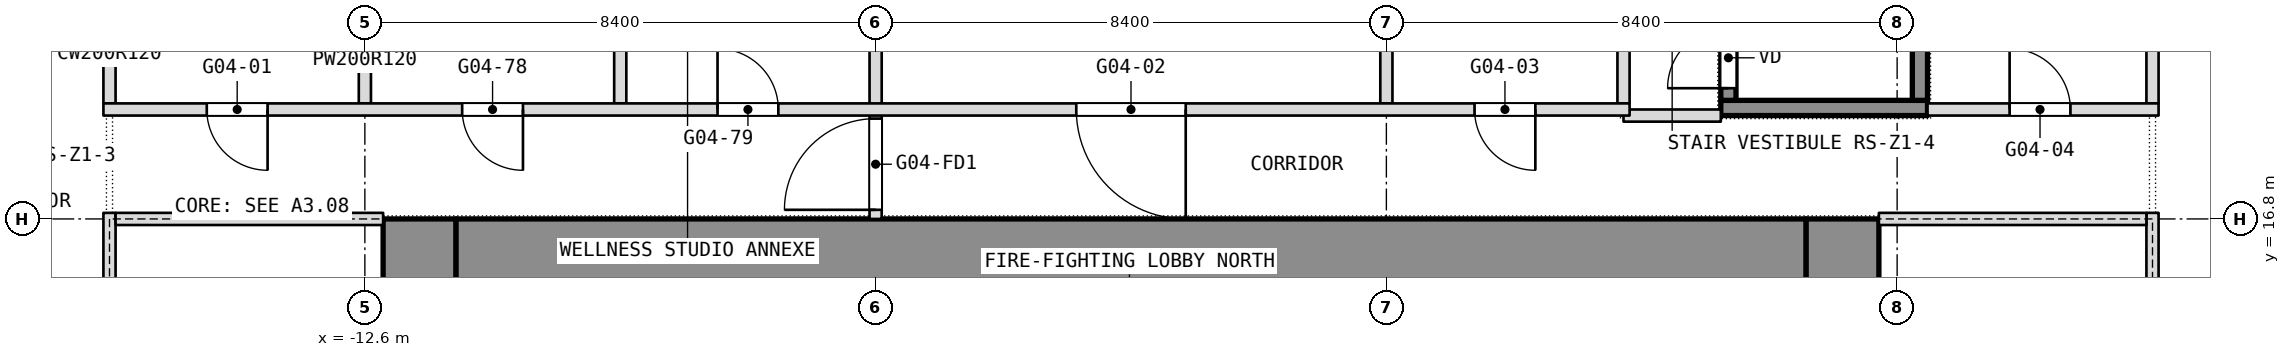
"""IFC4 building model, lengths in metres.
Left out: names, types, materials, properties, quantities, classifications, styles, units other than length and angle.
Written with IfcOpenShell. Run it as: python <this file> out.ifc"""

import sys

from ifc_helpers import new_model, si_unit, direction, frame, frame_2d, origin, place, context, subcontext, project, spatial, rectangle, extrude, element, fill, save


model = new_model("IFC4")
c1 = context("Model", 3, precision=1e-05, world=origin(), true_north=direction((0.0, 1.0)))
c2 = subcontext(c1, "Body", "Model", "MODEL_VIEW")
j1 = project(units=[si_unit("LENGTHUNIT", "METRE"), si_unit("PLANEANGLEUNIT", "RADIAN")], contexts=[c1])
p1 = place(None, origin())
s1 = spatial("IfcSite", under=j1, at=p1, CompositionType="ELEMENT")
p2 = place(p1, origin())
s2 = spatial("IfcBuilding", under=s1, at=p2, CompositionType="ELEMENT")
p3 = place(p2, frame((0.0, 0.0, 61.7)))
s3 = spatial("IfcBuildingStorey", under=s2, at=p3, CompositionType="ELEMENT", Elevation=61.7)
p4 = place(p3, frame((11.7, 0.0, 0.0), z_axis=(0.0, 0.0, 1.0), x_axis=(0.0, 1.0, 0.0)))
e1 = element("IfcWall", 1, at=p4, inside=s3, PredefinedType="SHEAR", context=c2, shape_type="SweptSolid", body=[
    extrude(rectangle(XDim=16.8, YDim=1.2, at=frame_2d((8.4, 0.0))), origin(), (0.0, 0.0, 1.0), 3.6),
])
p5 = place(p4, frame((1.762, 0.0, 0.0)))
e2 = element("IfcOpeningElement", 2, at=p5, cuts=e1, PredefinedType="OPENING", context=c2, shape_type="SweptSolid", body=[
    extrude(rectangle(XDim=0.9, YDim=2.1, at=frame_2d((0.45, 1.05))), frame((0.0, 0.6, 0.0), z_axis=(0.0, -1.0, 0.0), x_axis=(1.0, 0.0, 0.0)), (0.0, 0.0, 1.0), 1.2),
])
p6 = place(p4, frame((4.387, 0.0, 0.0)))
e3 = element("IfcOpeningElement", 3, at=p6, cuts=e1, PredefinedType="OPENING", context=c2, shape_type="SweptSolid", body=[
    extrude(rectangle(XDim=0.9, YDim=2.1, at=frame_2d((0.45, 1.05))), frame((0.0, 0.6, 0.0), z_axis=(0.0, -1.0, 0.0), x_axis=(1.0, 0.0, 0.0)), (0.0, 0.0, 1.0), 1.2),
])
p7 = place(p4, frame((6.825, 0.0, 0.0)))
e4 = element("IfcOpeningElement", 4, at=p7, cuts=e1, PredefinedType="OPENING", context=c2, shape_type="SweptSolid", body=[
    extrude(rectangle(XDim=1.2, YDim=2.1, at=frame_2d((0.6, 1.05))), frame((0.0, 0.6, 0.0), z_axis=(0.0, -1.0, 0.0), x_axis=(1.0, 0.0, 0.0)), (0.0, 0.0, 1.0), 1.2),
])
p8 = place(p4, frame((14.137, 0.0, 0.0)))
e5 = element("IfcOpeningElement", 5, at=p8, cuts=e1, PredefinedType="OPENING", context=c2, shape_type="SweptSolid", body=[
    extrude(rectangle(XDim=0.9, YDim=2.1, at=frame_2d((0.45, 1.05))), frame((0.0, 0.6, 0.0), z_axis=(0.0, -1.0, 0.0), x_axis=(1.0, 0.0, 0.0)), (0.0, 0.0, 1.0), 1.2),
])
p9 = place(p4, frame((11.512, 0.0, 0.0)))
e6 = element("IfcOpeningElement", 6, at=p9, cuts=e1, PredefinedType="OPENING", context=c2, shape_type="SweptSolid", body=[
    extrude(rectangle(XDim=0.9, YDim=2.1, at=frame_2d((0.45, 1.05))), frame((0.0, 0.6, 0.0), z_axis=(0.0, -1.0, 0.0), x_axis=(1.0, 0.0, 0.0)), (0.0, 0.0, 1.0), 1.2),
])
p10 = place(p4, frame((8.775, 0.0, 0.0)))
e7 = element("IfcOpeningElement", 7, at=p10, cuts=e1, PredefinedType="OPENING", context=c2, shape_type="SweptSolid", body=[
    extrude(rectangle(XDim=1.2, YDim=2.1, at=frame_2d((0.6, 1.05))), frame((0.0, 0.6, 0.0), z_axis=(0.0, -1.0, 0.0), x_axis=(1.0, 0.0, 0.0)), (0.0, 0.0, 1.0), 1.2),
])
p11 = place(p3, frame((-11.7, 0.0, 0.0), z_axis=(0.0, 0.0, 1.0), x_axis=(0.0, 1.0, 0.0)))
e8 = element("IfcWall", 8, at=p11, inside=s3, PredefinedType="SHEAR", context=c2, shape_type="SweptSolid", body=[
    extrude(rectangle(XDim=16.8, YDim=1.2, at=frame_2d((8.4, 0.0))), origin(), (0.0, 0.0, 1.0), 3.6),
])
p12 = place(p11, frame((2.3, 0.0, 0.0)))
e9 = element("IfcOpeningElement", 9, at=p12, cuts=e8, PredefinedType="OPENING", context=c2, shape_type="SweptSolid", body=[
    extrude(rectangle(XDim=1.1, YDim=2.1, at=frame_2d((0.55, 1.05))), frame((0.0, 0.6, 0.0), z_axis=(0.0, -1.0, 0.0), x_axis=(1.0, 0.0, 0.0)), (0.0, 0.0, 1.0), 1.2),
])
p13 = place(p11, frame((4.85, 0.0, 0.0)))
e10 = element("IfcOpeningElement", 10, at=p13, cuts=e8, PredefinedType="OPENING", context=c2, shape_type="SweptSolid", body=[
    extrude(rectangle(XDim=1.1, YDim=2.1, at=frame_2d((0.55, 1.05))), frame((0.0, 0.6, 0.0), z_axis=(0.0, -1.0, 0.0), x_axis=(1.0, 0.0, 0.0)), (0.0, 0.0, 1.0), 1.2),
])
p14 = place(p11, frame((6.825, 0.0, 0.0)))
e11 = element("IfcOpeningElement", 11, at=p14, cuts=e8, PredefinedType="OPENING", context=c2, shape_type="SweptSolid", body=[
    extrude(rectangle(XDim=1.2, YDim=2.1, at=frame_2d((0.6, 1.05))), frame((0.0, 0.6, 0.0), z_axis=(0.0, -1.0, 0.0), x_axis=(1.0, 0.0, 0.0)), (0.0, 0.0, 1.0), 1.2),
])
p15 = place(p11, frame((13.4, 0.0, 0.0)))
e12 = element("IfcOpeningElement", 12, at=p15, cuts=e8, PredefinedType="OPENING", context=c2, shape_type="SweptSolid", body=[
    extrude(rectangle(XDim=1.1, YDim=2.1, at=frame_2d((0.55, 1.05))), frame((0.0, 0.6, 0.0), z_axis=(0.0, -1.0, 0.0), x_axis=(1.0, 0.0, 0.0)), (0.0, 0.0, 1.0), 1.2),
])
p16 = place(p11, frame((10.85, 0.0, 0.0)))
e13 = element("IfcOpeningElement", 13, at=p16, cuts=e8, PredefinedType="OPENING", context=c2, shape_type="SweptSolid", body=[
    extrude(rectangle(XDim=1.1, YDim=2.1, at=frame_2d((0.55, 1.05))), frame((0.0, 0.6, 0.0), z_axis=(0.0, -1.0, 0.0), x_axis=(1.0, 0.0, 0.0)), (0.0, 0.0, 1.0), 1.2),
])
p17 = place(p11, frame((8.775, 0.0, 0.0)))
e14 = element("IfcOpeningElement", 14, at=p17, cuts=e8, PredefinedType="OPENING", context=c2, shape_type="SweptSolid", body=[
    extrude(rectangle(XDim=1.2, YDim=2.1, at=frame_2d((0.6, 1.05))), frame((0.0, 0.6, 0.0), z_axis=(0.0, -1.0, 0.0), x_axis=(1.0, 0.0, 0.0)), (0.0, 0.0, 1.0), 1.2),
])
p18 = place(p3, frame((-11.1, 16.2, 0.0), z_axis=(0.0, 0.0, 1.0), x_axis=(1.0, 0.0, 0.0)))
e15 = element("IfcWall", 15, at=p18, inside=s3, PredefinedType="SHEAR", context=c2, shape_type="SweptSolid", body=[
    extrude(rectangle(XDim=22.2, YDim=1.2, at=frame_2d((11.1, 0.0))), origin(), (0.0, 0.0, 1.0), 3.6),
])
p19 = place(p3, frame((16.8, 18.7, 0.0), z_axis=(0.0, 0.0, 1.0), x_axis=(0.0, 1.0, 0.0)))
e16 = element("IfcWall", 16, at=p19, inside=s3, PredefinedType="PARTITIONING", context=c2, shape_type="SweptSolid", body=[
    extrude(rectangle(XDim=3.0, YDim=0.2, at=frame_2d((1.5, 0.0))), origin(), (0.0, 0.0, 1.0), 3.34),
])
for number, where, z_axis, x_axis in (
    (17, (8.1, 18.7, 0.0), (0.0, 0.0, 1.0), (0.0, 1.0, 0.0)),
    (18, (4.2, 18.7, 0.0), (0.0, 0.0, 1.0), (0.0, 1.0, 0.0)),
):
    element("IfcWall", number, at=place(p3, frame(where, z_axis=z_axis, x_axis=x_axis)), inside=s3, PredefinedType="PARTITIONING", context=c2, shape_type="SweptSolid", body=[
        extrude(rectangle(XDim=2.8, YDim=0.2, at=frame_2d((1.4, 0.0))), origin(), (0.0, 0.0, 1.0), 3.34),
    ])
p20 = place(p3, frame((-4.2, 16.8, 0.0), z_axis=(0.0, 0.0, 1.0), x_axis=(0.0, 1.0, 0.0)))
e19 = element("IfcWall", 19, at=p20, inside=s3, PredefinedType="PARTITIONING", context=c2, shape_type="SweptSolid", body=[
    extrude(rectangle(XDim=6.7, YDim=0.2, at=frame_2d((3.35, 0.0))), origin(), (0.0, 0.0, 1.0), 3.34),
])
p21 = place(p20, frame((0.15, 0.0, 0.0)))
e20 = element("IfcOpeningElement", 20, at=p21, cuts=e19, PredefinedType="OPENING", context=c2, shape_type="SweptSolid", body=[
    extrude(rectangle(XDim=1.5, YDim=2.1, at=frame_2d((0.75, 1.05))), frame((0.0, 0.1, 0.0), z_axis=(0.0, -1.0, 0.0), x_axis=(1.0, 0.0, 0.0)), (0.0, 0.0, 1.0), 0.2),
])
p22 = place(p20, frame((4.95, 0.0, 0.0)))
e21 = element("IfcOpeningElement", 21, at=p22, cuts=e19, PredefinedType="OPENING", context=c2, shape_type="SweptSolid", body=[
    extrude(rectangle(XDim=1.5, YDim=2.1, at=frame_2d((0.75, 1.05))), frame((0.0, 0.1, 0.0), z_axis=(0.0, -1.0, 0.0), x_axis=(1.0, 0.0, 0.0)), (0.0, 0.0, 1.0), 0.2),
])
for number, where, z_axis, x_axis in (
    (22, (-8.4, 18.7, 0.0), (0.0, 0.0, 1.0), (0.0, 1.0, 0.0)),
    (23, (-12.6, 18.7, 0.0), (0.0, 0.0, 1.0), (0.0, 1.0, 0.0)),
):
    element("IfcWall", number, at=place(p3, frame(where, z_axis=z_axis, x_axis=x_axis)), inside=s3, PredefinedType="PARTITIONING", context=c2, shape_type="SweptSolid", body=[
        extrude(rectangle(XDim=2.8, YDim=0.2, at=frame_2d((1.4, 0.0))), origin(), (0.0, 0.0, 1.0), 3.34),
    ])
p23 = place(p3, frame((-16.8, 18.7, 0.0), z_axis=(0.0, 0.0, 1.0), x_axis=(0.0, 1.0, 0.0)))
e24 = element("IfcWall", 24, at=p23, inside=s3, PredefinedType="PARTITIONING", context=c2, shape_type="SweptSolid", body=[
    extrude(rectangle(XDim=3.0, YDim=0.2, at=frame_2d((1.5, 0.0))), origin(), (0.0, 0.0, 1.0), 3.34),
])
p24 = place(p3, frame((8.1, 18.5, 0.0), z_axis=(0.0, 0.0, 1.0), x_axis=(1.0, 0.0, 0.0)))
e25 = element("IfcWall", 25, at=p24, inside=s3, PredefinedType="PARTITIONING", context=c2, shape_type="SweptSolid", body=[
    extrude(rectangle(XDim=1.6, YDim=0.2, at=frame_2d((0.8, 0.0))), origin(), (0.0, 0.0, 1.0), 3.34),
])
p25 = place(p3, frame((-16.9, 18.6, 0.0), z_axis=(0.0, 0.0, 1.0), x_axis=(1.0, 0.0, 0.0)))
e26 = element("IfcWall", 26, at=p25, inside=s3, PredefinedType="PARTITIONING", context=c2, shape_type="SweptSolid", body=[
    extrude(rectangle(XDim=25.1, YDim=0.2, at=frame_2d((12.55, 0.0))), origin(), (0.0, 0.0, 1.0), 3.34),
])
p26 = place(p25, frame((1.7, 0.0, 0.0)))
e27 = element("IfcOpeningElement", 27, at=p26, cuts=e26, PredefinedType="OPENING", context=c2, shape_type="SweptSolid", body=[
    extrude(rectangle(XDim=1.0, YDim=2.1, at=frame_2d((0.5, 1.05))), frame((0.0, 0.1, 0.0), z_axis=(0.0, -1.0, 0.0), x_axis=(1.0, 0.0, 0.0)), (0.0, 0.0, 1.0), 0.2),
])
p27 = place(p25, frame((16.0, 0.0, 0.0)))
e28 = element("IfcOpeningElement", 28, at=p27, cuts=e26, PredefinedType="OPENING", context=c2, shape_type="SweptSolid", body=[
    extrude(rectangle(XDim=1.8, YDim=2.1, at=frame_2d((0.9, 1.05))), frame((0.0, 0.1, 0.0), z_axis=(0.0, -1.0, 0.0), x_axis=(1.0, 0.0, 0.0)), (0.0, 0.0, 1.0), 0.2),
])
p28 = place(p25, frame((22.55, 0.0, 0.0)))
e29 = element("IfcOpeningElement", 29, at=p28, cuts=e26, PredefinedType="OPENING", context=c2, shape_type="SweptSolid", body=[
    extrude(rectangle(XDim=1.0, YDim=2.1, at=frame_2d((0.5, 1.05))), frame((0.0, 0.1, 0.0), z_axis=(0.0, -1.0, 0.0), x_axis=(1.0, 0.0, 0.0)), (0.0, 0.0, 1.0), 0.2),
])
p29 = place(p25, frame((5.9, 0.0, 0.0)))
e30 = element("IfcOpeningElement", 30, at=p29, cuts=e26, PredefinedType="OPENING", context=c2, shape_type="SweptSolid", body=[
    extrude(rectangle(XDim=1.0, YDim=2.1, at=frame_2d((0.5, 1.05))), frame((0.0, 0.1, 0.0), z_axis=(0.0, -1.0, 0.0), x_axis=(1.0, 0.0, 0.0)), (0.0, 0.0, 1.0), 0.2),
])
p30 = place(p25, frame((10.1, 0.0, 0.0)))
e31 = element("IfcOpeningElement", 31, at=p30, cuts=e26, PredefinedType="OPENING", context=c2, shape_type="SweptSolid", body=[
    extrude(rectangle(XDim=1.0, YDim=2.1, at=frame_2d((0.5, 1.05))), frame((0.0, 0.1, 0.0), z_axis=(0.0, -1.0, 0.0), x_axis=(1.0, 0.0, 0.0)), (0.0, 0.0, 1.0), 0.2),
])
p31 = place(p3, frame((13.1, 18.6, 0.0), z_axis=(0.0, 0.0, 1.0), x_axis=(1.0, 0.0, 0.0)))
e32 = element("IfcWall", 32, at=p31, inside=s3, PredefinedType="PARTITIONING", context=c2, shape_type="SweptSolid", body=[
    extrude(rectangle(XDim=3.8, YDim=0.2, at=frame_2d((1.9, 0.0))), origin(), (0.0, 0.0, 1.0), 3.34),
])
p32 = place(p31, frame((1.35, 0.0, 0.0)))
e33 = element("IfcOpeningElement", 33, at=p32, cuts=e32, PredefinedType="OPENING", context=c2, shape_type="SweptSolid", body=[
    extrude(rectangle(XDim=1.0, YDim=2.1, at=frame_2d((0.5, 1.05))), frame((0.0, 0.1, 0.0), z_axis=(0.0, -1.0, 0.0), x_axis=(1.0, 0.0, 0.0)), (0.0, 0.0, 1.0), 0.2),
])
p33 = place(p3, frame((-16.8, -0.1, 0.0), z_axis=(0.0, 0.0, 1.0), x_axis=(0.0, 1.0, 0.0)))
e34 = element("IfcWall", 34, at=p33, inside=s3, PredefinedType="PARTITIONING", context=c2, shape_type="SweptSolid", body=[
    extrude(rectangle(XDim=17.0, YDim=0.2, at=frame_2d((8.5, 0.0))), origin(), (0.0, 0.0, 1.0), 3.34),
])
p34 = place(p33, frame((2.2, 0.0, 0.0)))
e35 = element("IfcOpeningElement", 35, at=p34, cuts=e34, PredefinedType="OPENING", context=c2, shape_type="SweptSolid", body=[
    extrude(rectangle(XDim=1.8, YDim=2.1, at=frame_2d((0.9, 1.05))), frame((0.0, 0.1, 0.0), z_axis=(0.0, -1.0, 0.0), x_axis=(1.0, 0.0, 0.0)), (0.0, 0.0, 1.0), 0.2),
])
p35 = place(p33, frame((7.2, 0.0, 0.0)))
e36 = element("IfcOpeningElement", 36, at=p35, cuts=e34, PredefinedType="OPENING", context=c2, shape_type="SweptSolid", body=[
    extrude(rectangle(XDim=1.8, YDim=2.1, at=frame_2d((0.9, 1.05))), frame((0.0, 0.1, 0.0), z_axis=(0.0, -1.0, 0.0), x_axis=(1.0, 0.0, 0.0)), (0.0, 0.0, 1.0), 0.2),
])
p36 = place(p3, frame((-16.7, 16.8, 0.0), z_axis=(0.0, 0.0, 1.0), x_axis=(1.0, 0.0, 0.0)))
e37 = element("IfcWall", 37, at=p36, inside=s3, PredefinedType="PARTITIONING", context=c2, shape_type="SweptSolid", body=[
    extrude(rectangle(XDim=4.4, YDim=0.2, at=frame_2d((2.2, 0.0))), origin(), (0.0, 0.0, 1.0), 2.84),
])
p37 = place(p3, frame((16.8, -0.1, 0.0), z_axis=(0.0, 0.0, 1.0), x_axis=(0.0, 1.0, 0.0)))
e38 = element("IfcWall", 38, at=p37, inside=s3, PredefinedType="PARTITIONING", context=c2, shape_type="SweptSolid", body=[
    extrude(rectangle(XDim=17.0, YDim=0.2, at=frame_2d((8.5, 0.0))), origin(), (0.0, 0.0, 1.0), 3.34),
])
p38 = place(p37, frame((2.2, 0.0, 0.0)))
e39 = element("IfcOpeningElement", 39, at=p38, cuts=e38, PredefinedType="OPENING", context=c2, shape_type="SweptSolid", body=[
    extrude(rectangle(XDim=1.8, YDim=2.1, at=frame_2d((0.9, 1.05))), frame((0.0, 0.1, 0.0), z_axis=(0.0, -1.0, 0.0), x_axis=(1.0, 0.0, 0.0)), (0.0, 0.0, 1.0), 0.2),
])
p39 = place(p37, frame((13.0, 0.0, 0.0)))
e40 = element("IfcOpeningElement", 40, at=p39, cuts=e38, PredefinedType="OPENING", context=c2, shape_type="SweptSolid", body=[
    extrude(rectangle(XDim=1.8, YDim=2.1, at=frame_2d((0.9, 1.05))), frame((0.0, 0.1, 0.0), z_axis=(0.0, -1.0, 0.0), x_axis=(1.0, 0.0, 0.0)), (0.0, 0.0, 1.0), 0.2),
])
p40 = place(p3, frame((12.3, 16.8, 0.0), z_axis=(0.0, 0.0, 1.0), x_axis=(1.0, 0.0, 0.0)))
e41 = element("IfcWall", 41, at=p40, inside=s3, PredefinedType="PARTITIONING", context=c2, shape_type="SweptSolid", body=[
    extrude(rectangle(XDim=4.4, YDim=0.2, at=frame_2d((2.2, 0.0))), origin(), (0.0, 0.0, 1.0), 2.84),
])
p41 = place(p3, frame((9.7, 18.625, 0.1), z_axis=(0.0, 0.0, 1.0), x_axis=(1.0, 0.0, 0.0)))
e42 = element("IfcWall", 42, at=p41, inside=s3, PredefinedType="SHEAR", context=c2, shape_type="SweptSolid", body=[
    extrude(rectangle(XDim=3.4, YDim=0.25, at=frame_2d((1.7, 0.0))), origin(), (0.0, 0.0, 1.0), 3.6),
])
p42 = place(p3, frame((9.825, 18.75, 0.1), z_axis=(0.0, 0.0, 1.0), x_axis=(0.0, 1.0, 0.0)))
e43 = element("IfcWall", 43, at=p42, inside=s3, PredefinedType="SHEAR", context=c2, shape_type="SweptSolid", body=[
    extrude(rectangle(XDim=5.7, YDim=0.25, at=frame_2d((2.85, 0.0))), origin(), (0.0, 0.0, 1.0), 3.6),
])
p43 = place(p42, frame((0.2, 0.0, 0.0)))
e44 = element("IfcOpeningElement", 44, at=p43, cuts=e43, PredefinedType="OPENING", context=c2, shape_type="SweptSolid", body=[
    extrude(rectangle(XDim=1.0, YDim=2.1, at=frame_2d((0.5, 1.05))), frame((0.0, 0.125, 0.0), z_axis=(0.0, -1.0, 0.0), x_axis=(1.0, 0.0, 0.0)), (0.0, 0.0, 1.0), 0.25),
])
p44 = place(p3, frame((12.975, 18.75, 0.1), z_axis=(0.0, 0.0, 1.0), x_axis=(0.0, 1.0, 0.0)))
e45 = element("IfcWall", 45, at=p44, inside=s3, PredefinedType="SHEAR", context=c2, shape_type="SweptSolid", body=[
    extrude(rectangle(XDim=5.7, YDim=0.25, at=frame_2d((2.85, 0.0))), origin(), (0.0, 0.0, 1.0), 3.6),
])
p45 = place(p26, origin())
e46 = element("IfcDoor", 46, at=p45, inside=s3, OperationType="SINGLE_SWING_RIGHT", PredefinedType="DOOR", context=c2, shape_type="SweptSolid", body=[
    extrude(rectangle(XDim=1.0, YDim=2.1, at=frame_2d((0.5, 1.05))), frame((0.0, 0.025, 0.0), z_axis=(0.0, -1.0, 0.0), x_axis=(1.0, 0.0, 0.0)), (0.0, 0.0, 1.0), 0.05),
])
fill(e27, e46)
p46 = place(p27, origin())
e47 = element("IfcDoor", 47, at=p46, inside=s3, OperationType="DOUBLE_DOOR_SINGLE_SWING", PredefinedType="DOOR", context=c2, shape_type="SweptSolid", body=[
    extrude(rectangle(XDim=1.8, YDim=2.1, at=frame_2d((0.9, 1.05))), frame((0.0, 0.025, 0.0), z_axis=(0.0, -1.0, 0.0), x_axis=(1.0, 0.0, 0.0)), (0.0, 0.0, 1.0), 0.05),
])
fill(e28, e47)
p47 = place(p28, origin())
e48 = element("IfcDoor", 48, at=p47, inside=s3, OperationType="SINGLE_SWING_LEFT", PredefinedType="DOOR", context=c2, shape_type="SweptSolid", body=[
    extrude(rectangle(XDim=1.0, YDim=2.1, at=frame_2d((0.5, 1.05))), frame((0.0, 0.025, 0.0), z_axis=(0.0, -1.0, 0.0), x_axis=(1.0, 0.0, 0.0)), (0.0, 0.0, 1.0), 0.05),
])
fill(e29, e48)
p48 = place(p29, origin())
e49 = element("IfcDoor", 49, at=p48, inside=s3, OperationType="SINGLE_SWING_RIGHT", PredefinedType="DOOR", context=c2, shape_type="SweptSolid", body=[
    extrude(rectangle(XDim=1.0, YDim=2.1, at=frame_2d((0.5, 1.05))), frame((0.0, 0.025, 0.0), z_axis=(0.0, -1.0, 0.0), x_axis=(1.0, 0.0, 0.0)), (0.0, 0.0, 1.0), 0.05),
])
fill(e30, e49)
p49 = place(p30, origin())
e50 = element("IfcDoor", 50, at=p49, inside=s3, OperationType="SINGLE_SWING_LEFT", PredefinedType="DOOR", context=c2, shape_type="SweptSolid", body=[
    extrude(rectangle(XDim=1.0, YDim=2.1, at=frame_2d((0.5, 1.05))), frame((0.0, 0.025, 0.0), z_axis=(0.0, -1.0, 0.0), x_axis=(1.0, 0.0, 0.0)), (0.0, 0.0, 1.0), 0.05),
])
fill(e31, e50)
p50 = place(p32, origin())
e51 = element("IfcDoor", 51, at=p50, inside=s3, OperationType="SINGLE_SWING_LEFT", PredefinedType="DOOR", context=c2, shape_type="SweptSolid", body=[
    extrude(rectangle(XDim=1.0, YDim=2.1, at=frame_2d((0.5, 1.05))), frame((0.0, 0.025, 0.0), z_axis=(0.0, -1.0, 0.0), x_axis=(1.0, 0.0, 0.0)), (0.0, 0.0, 1.0), 0.05),
])
fill(e33, e51)
p51 = place(p43, origin())
e52 = element("IfcDoor", 52, at=p51, inside=s3, OperationType="SINGLE_SWING_LEFT", PredefinedType="DOOR", context=c2, shape_type="SweptSolid", body=[
    extrude(rectangle(XDim=1.0, YDim=2.1, at=frame_2d((0.5, 1.05))), frame((0.0, 0.025, 0.0), z_axis=(0.0, -1.0, 0.0), x_axis=(1.0, 0.0, 0.0)), (0.0, 0.0, 1.0), 0.05),
])
fill(e44, e52)
p52 = place(p21, origin())
e53 = element("IfcDoor", 53, at=p52, inside=s3, OperationType="DOUBLE_DOOR_DOUBLE_SWING", PredefinedType="DOOR", context=c2, shape_type="SweptSolid", body=[
    extrude(rectangle(XDim=1.5, YDim=2.1, at=frame_2d((0.75, 1.05))), frame((0.0, 0.025, 0.0), z_axis=(0.0, -1.0, 0.0), x_axis=(1.0, 0.0, 0.0)), (0.0, 0.0, 1.0), 0.05),
])
fill(e20, e53)
save(model, sys.argv[1])
